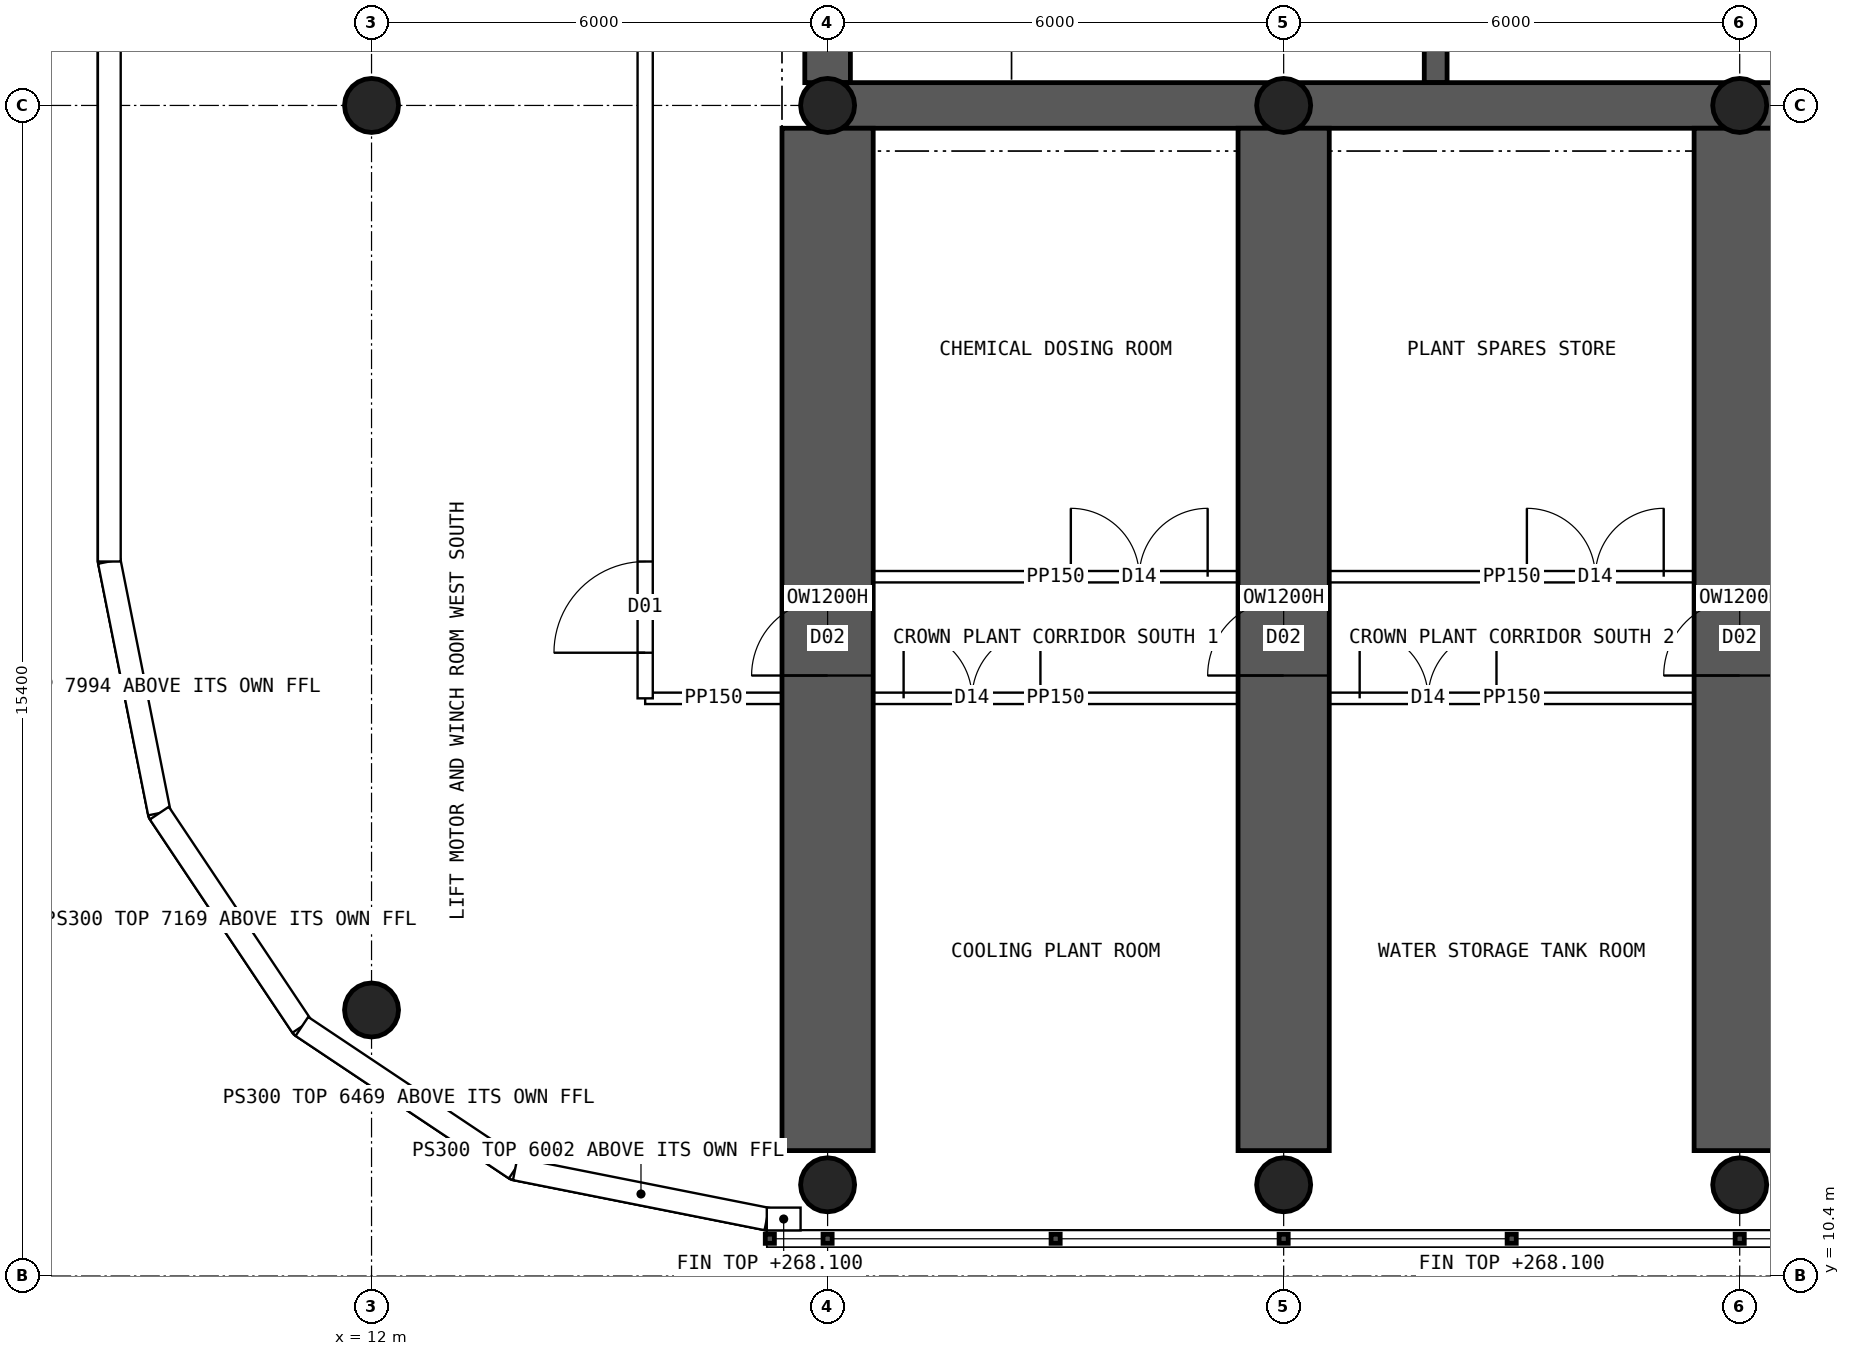
"""IFC4 building model, lengths in metres.
Left out: names, types, materials, properties, quantities, classifications, styles, units other than length and angle.
Written with IfcOpenShell. Run it as: python <this file> out.ifc"""

import sys

from ifc_helpers import new_model, si_unit, direction, frame, frame_2d, origin, origin_2d, place, context, subcontext, project, spatial, polyline, rectangle, hollow_circle, outline, extrude, clip, halfspace, element, fill, save


model = new_model("IFC4")
c1 = context("Model", 3, precision=1e-05, world=origin(), true_north=direction((0.0, 1.0)))
c2 = subcontext(c1, "Body", "Model", "MODEL_VIEW")
j1 = project(units=[si_unit("LENGTHUNIT", "METRE"), si_unit("PLANEANGLEUNIT", "RADIAN")], contexts=[c1])
p1 = place(None, origin())
s1 = spatial("IfcSite", under=j1, at=p1, CompositionType="ELEMENT")
p2 = place(p1, origin())
s2 = spatial("IfcBuilding", under=s1, at=p2, CompositionType="ELEMENT")
p3 = place(p2, frame((0.0, 0.0, 262.3)))
s3 = spatial("IfcBuildingStorey", under=s2, at=p3, CompositionType="ELEMENT", Elevation=262.3)
p4 = place(p3, frame((18.0, 25.8, 0.0), z_axis=(0.0, 0.0, 1.0), x_axis=(1.0, 0.0, 0.0)))
e1 = element("IfcWall", 1, at=p4, inside=s3, PredefinedType="SHEAR", context=c2, shape_type="SweptSolid", body=[
    extrude(rectangle(XDim=48.0, YDim=0.6, at=frame_2d((24.0, 0.0))), origin(), (0.0, 0.0, 1.0), 6.0),
])
p5 = place(p3, frame((18.0, 26.1, 0.0), z_axis=(0.0, 0.0, 1.0), x_axis=(0.0, 1.0, 0.0)))
e2 = element("IfcWall", 2, at=p5, inside=s3, PredefinedType="SHEAR", context=c2, shape_type="SweptSolid", body=[
    extrude(rectangle(XDim=11.8, YDim=0.6, at=frame_2d((5.9, 0.0))), origin(), (0.0, 0.0, 1.0), 6.0),
])
p6 = place(p5, frame((5.2, 0.0, 0.0)))
e3 = element("IfcOpeningElement", 3, at=p6, cuts=e2, PredefinedType="OPENING", context=c2, shape_type="SweptSolid", body=[
    extrude(rectangle(XDim=1.2, YDim=2.1, at=frame_2d((0.6, 1.05))), frame((0.0, 0.31, 0.0), z_axis=(0.0, -1.0, 0.0), x_axis=(1.0, 0.0, 0.0)), (0.0, 0.0, 1.0), 0.62),
])
p7 = place(p3, frame((26.0, 26.1, 0.0), z_axis=(0.0, 0.0, 1.0), x_axis=(0.0, 1.0, 0.0)))
e4 = element("IfcWall", 4, at=p7, inside=s3, PredefinedType="SHEAR", context=c2, shape_type="SweptSolid", body=[
    extrude(rectangle(XDim=4.15, YDim=0.3, at=frame_2d((2.075, 0.0))), origin(), (0.0, 0.0, 1.0), 6.0),
])
p8 = place(p3, frame((18.0, 12.05, 0.0), z_axis=(0.0, 0.0, 1.0), x_axis=(0.0, 1.0, 0.0)))
e5 = element("IfcWall", 5, at=p8, inside=s3, PredefinedType="SHEAR", context=c2, shape_type="SweptSolid", body=[
    extrude(rectangle(XDim=13.45, YDim=1.2, at=frame_2d((6.725, 0.0))), origin(), (0.0, 0.0, 1.0), 4.4),
])
p9 = place(p8, frame((6.25, 0.0, 0.0)))
e6 = element("IfcOpeningElement", 6, at=p9, cuts=e5, PredefinedType="OPENING", context=c2, shape_type="SweptSolid", body=[
    extrude(rectangle(XDim=1.0, YDim=2.1, at=frame_2d((0.5, 1.05))), frame((0.0, 0.61, 0.0), z_axis=(0.0, -1.0, 0.0), x_axis=(1.0, 0.0, 0.0)), (0.0, 0.0, 1.0), 1.22),
])
p10 = place(p3, frame((24.0, 12.05, 0.0), z_axis=(0.0, 0.0, 1.0), x_axis=(0.0, 1.0, 0.0)))
e7 = element("IfcWall", 7, at=p10, inside=s3, PredefinedType="SHEAR", context=c2, shape_type="SweptSolid", body=[
    extrude(rectangle(XDim=13.45, YDim=1.2, at=frame_2d((6.725, 0.0))), origin(), (0.0, 0.0, 1.0), 4.4),
])
p11 = place(p10, frame((6.25, 0.0, 0.0)))
e8 = element("IfcOpeningElement", 8, at=p11, cuts=e7, PredefinedType="OPENING", context=c2, shape_type="SweptSolid", body=[
    extrude(rectangle(XDim=1.0, YDim=2.1, at=frame_2d((0.5, 1.05))), frame((0.0, 0.61, 0.0), z_axis=(0.0, -1.0, 0.0), x_axis=(1.0, 0.0, 0.0)), (0.0, 0.0, 1.0), 1.22),
])
p12 = place(p3, frame((30.0, 12.05, 0.0), z_axis=(0.0, 0.0, 1.0), x_axis=(0.0, 1.0, 0.0)))
e9 = element("IfcWall", 9, at=p12, inside=s3, PredefinedType="SHEAR", context=c2, shape_type="SweptSolid", body=[
    extrude(rectangle(XDim=13.45, YDim=1.2, at=frame_2d((6.725, 0.0))), origin(), (0.0, 0.0, 1.0), 4.4),
])
p13 = place(p12, frame((6.25, 0.0, 0.0)))
e10 = element("IfcOpeningElement", 10, at=p13, cuts=e9, PredefinedType="OPENING", context=c2, shape_type="SweptSolid", body=[
    extrude(rectangle(XDim=1.0, YDim=2.1, at=frame_2d((0.5, 1.05))), frame((0.0, 0.61, 0.0), z_axis=(0.0, -1.0, 0.0), x_axis=(1.0, 0.0, 0.0)), (0.0, 0.0, 1.0), 1.22),
])
p14 = place(p3, frame((12.0, 13.9, 0.0), z_axis=(0.0, 0.0, 1.0), x_axis=(1.0, 0.0, 0.0)))
e11 = element("IfcColumn", 11, at=p14, inside=s3, PredefinedType="COLUMN", context=c2, shape_type="SweptSolid", body=[
    extrude(hollow_circle(Radius=0.355, WallThickness=0.025, at=origin_2d()), origin(), (0.0, 0.0, 1.0), 5.466),
])
p15 = place(p3, frame((12.0, 25.8, 0.0), z_axis=(0.0, 0.0, 1.0), x_axis=(1.0, 0.0, 0.0)))
e12 = element("IfcColumn", 12, at=p15, inside=s3, PredefinedType="COLUMN", context=c2, shape_type="SweptSolid", body=[
    extrude(hollow_circle(Radius=0.355, WallThickness=0.025, at=origin_2d()), origin(), (0.0, 0.0, 1.0), 8.433),
])
p16 = place(p3, frame((18.0, 11.6, 0.0), z_axis=(0.0, 0.0, 1.0), x_axis=(1.0, 0.0, 0.0)))
e13 = element("IfcColumn", 13, at=p16, inside=s3, PredefinedType="COLUMN", context=c2, shape_type="SweptSolid", body=[
    extrude(hollow_circle(Radius=0.355, WallThickness=0.025, at=origin_2d()), origin(), (0.0, 0.0, 1.0), 4.885),
])
p17 = place(p3, frame((18.0, 25.8, 0.0), z_axis=(0.0, 0.0, 1.0), x_axis=(1.0, 0.0, 0.0)))
e14 = element("IfcColumn", 14, at=p17, inside=s3, PredefinedType="COLUMN", context=c2, shape_type="SweptSolid", body=[
    extrude(hollow_circle(Radius=0.355, WallThickness=0.025, at=origin_2d()), origin(), (0.0, 0.0, 1.0), 8.426),
])
p18 = place(p3, frame((24.0, 11.6, 0.0), z_axis=(0.0, 0.0, 1.0), x_axis=(1.0, 0.0, 0.0)))
e15 = element("IfcColumn", 15, at=p18, inside=s3, PredefinedType="COLUMN", context=c2, shape_type="SweptSolid", body=[
    extrude(hollow_circle(Radius=0.355, WallThickness=0.025, at=origin_2d()), origin(), (0.0, 0.0, 1.0), 4.885),
])
p19 = place(p3, frame((24.0, 25.8, 0.0), z_axis=(0.0, 0.0, 1.0), x_axis=(1.0, 0.0, 0.0)))
e16 = element("IfcColumn", 16, at=p19, inside=s3, PredefinedType="COLUMN", context=c2, shape_type="SweptSolid", body=[
    extrude(hollow_circle(Radius=0.355, WallThickness=0.025, at=origin_2d()), origin(), (0.0, 0.0, 1.0), 8.426),
])
p20 = place(p3, frame((30.0, 11.6, 0.0), z_axis=(0.0, 0.0, 1.0), x_axis=(1.0, 0.0, 0.0)))
e17 = element("IfcColumn", 17, at=p20, inside=s3, PredefinedType="COLUMN", context=c2, shape_type="SweptSolid", body=[
    extrude(hollow_circle(Radius=0.355, WallThickness=0.025, at=origin_2d()), origin(), (0.0, 0.0, 1.0), 4.885),
])
p21 = place(p3, frame((30.0, 25.8, 0.0), z_axis=(0.0, 0.0, 1.0), x_axis=(1.0, 0.0, 0.0)))
e18 = element("IfcColumn", 18, at=p21, inside=s3, PredefinedType="COLUMN", context=c2, shape_type="SweptSolid", body=[
    extrude(hollow_circle(Radius=0.355, WallThickness=0.025, at=origin_2d()), origin(), (0.0, 0.0, 1.0), 8.426),
])
p22 = place(p3, frame((8.55, 44.2, 0.0), z_axis=(0.0, 0.0, 1.0), x_axis=(0.0, -1.0, 0.0)))
e19 = element("IfcWall", 19, at=p22, inside=s3, PredefinedType="SOLIDWALL", context=c2, shape_type="Clipping", body=[
    clip(clip(extrude(outline(polyline([(-0.025, 0.0), (24.425, 0.0), (24.425, 7.988), (-0.025, 14.084), (-0.025, 0.0)])), frame((0.0, 0.15, 0.0), z_axis=(0.0, -1.0, 0.0), x_axis=(1.0, 0.0, 0.0)), (0.0, 0.0, 1.0), 0.3), halfspace(frame((0.0, 0.0, 0.0), z_axis=(-0.995184726707, 0.098017139978, 0.0)), False)), halfspace(frame((24.4, 0.0, 0.0), z_axis=(0.995184726707, 0.098017139978, 0.0)), False)),
])
p23 = place(p3, frame((8.55, 19.8, 0.0), z_axis=(0.0, 0.0, 1.0), x_axis=(0.19508664885, -0.980786011034, 0.0)))
e20 = element("IfcWall", 20, at=p23, inside=s3, PredefinedType="SOLIDWALL", context=c2, shape_type="Clipping", body=[
    clip(clip(extrude(outline(polyline([(-0.04, 0.0), (3.415, 0.0), (3.415, 7.159), (3.375, 7.169), (-0.04, 8.004), (-0.04, 0.0)])), frame((0.0, 0.15, 0.0), z_axis=(0.0, -1.0, 0.0), x_axis=(1.0, 0.0, 0.0)), (0.0, 0.0, 1.0), 0.3), halfspace(frame((0.0, 0.0, 0.0), z_axis=(-0.995184765828, 0.098016742771, 0.0)), False)), halfspace(frame((3.375, 0.0, 0.0), z_axis=(0.980785349348, 0.195089975409, 0.0)), False)),
])
p24 = place(p3, frame((9.208, 16.49, 0.0), z_axis=(0.0, 0.0, 1.0), x_axis=(0.555567969291, -0.831471124873, 0.0)))
e21 = element("IfcWall", 21, at=p24, inside=s3, PredefinedType="SOLIDWALL", context=c2, shape_type="Clipping", body=[
    clip(clip(extrude(outline(polyline([(-0.04, 0.0), (3.415, 0.0), (3.415, 6.461), (-0.04, 7.177), (-0.04, 0.0)])), frame((0.0, 0.15, 0.0), z_axis=(0.0, -1.0, 0.0), x_axis=(1.0, 0.0, 0.0)), (0.0, 0.0, 1.0), 0.3), halfspace(frame((0.0, 0.0, 0.0), z_axis=(-0.980785349348, 0.195089975409, 0.0)), False)), halfspace(frame((3.375, 0.0, 0.0), z_axis=(0.980785349348, 0.195089975409, 0.0)), False)),
])
p25 = place(p3, frame((11.083, 13.684, 0.0), z_axis=(0.0, 0.0, 1.0), x_axis=(0.831460037396, -0.555584562613, 0.0)))
e22 = element("IfcWall", 22, at=p25, inside=s3, PredefinedType="SOLIDWALL", context=c2, shape_type="Clipping", body=[
    clip(clip(extrude(outline(polyline([(-0.04, 0.0), (3.415, 0.0), (3.415, 5.996), (3.375, 6.001), (-0.04, 6.475), (-0.04, 0.0)])), frame((0.0, 0.15, 0.0), z_axis=(0.0, -1.0, 0.0), x_axis=(1.0, 0.0, 0.0)), (0.0, 0.0, 1.0), 0.3), halfspace(frame((0.0, 0.0, 0.0), z_axis=(-0.980785349348, 0.195089975409, 0.0)), False)), halfspace(frame((3.375, 0.0, 0.0), z_axis=(0.980785349348, 0.195089975409, 0.0)), False)),
])
p26 = place(p3, frame((13.89, 11.808, 0.0), z_axis=(0.0, 0.0, 1.0), x_axis=(0.98078325777, -0.195100490205, 0.0)))
e23 = element("IfcWall", 23, at=p26, inside=s3, PredefinedType="SOLIDWALL", context=c2, shape_type="Clipping", body=[
    clip(clip(extrude(outline(polyline([(-0.04, 0.0), (3.415, 0.0), (3.415, 5.835), (-0.04, 6.003), (-0.04, 0.0)])), frame((0.0, 0.15, 0.0), z_axis=(0.0, -1.0, 0.0), x_axis=(1.0, 0.0, 0.0)), (0.0, 0.0, 1.0), 0.3), halfspace(frame((0.0, 0.0, 0.0), z_axis=(-0.980785349348, 0.195089975409, 0.0)), False)), halfspace(frame((3.375, 0.0, 0.0), z_axis=(0.980785349348, 0.195089975409, 0.0)), False)),
])
p27 = place(p3, frame((17.2, 11.15, 0.0), z_axis=(0.0, 0.0, 1.0), x_axis=(1.0, 0.0, 0.0)))
e24 = element("IfcWall", 24, at=p27, inside=s3, PredefinedType="SOLIDWALL", context=c2, shape_type="SweptSolid", body=[
    extrude(outline(polyline([(0.0, 0.0), (0.445, 0.0), (0.445, 5.837), (0.0, 5.837), (0.0, 0.0)])), frame((0.0, 0.15, 0.0), z_axis=(0.0, -1.0, 0.0), x_axis=(1.0, 0.0, 0.0)), (0.0, 0.0, 1.0), 0.3),
])
p28 = place(p3, frame((15.6, 18.0, 0.0), z_axis=(0.0, 0.0, 1.0), x_axis=(0.0, 1.0, 0.0)))
e25 = element("IfcWall", 25, at=p28, inside=s3, PredefinedType="SOLIDWALL", context=c2, shape_type="SweptSolid", body=[
    extrude(rectangle(XDim=28.0, YDim=0.2, at=frame_2d((14.0, 0.0))), origin(), (0.0, 0.0, 1.0), 6.0),
])
p29 = place(p28, frame((13.1, 0.0, 0.0)))
e26 = element("IfcOpeningElement", 26, at=p29, cuts=e25, PredefinedType="OPENING", context=c2, shape_type="SweptSolid", body=[
    extrude(rectangle(XDim=1.8, YDim=2.1, at=frame_2d((0.9, 1.05))), frame((0.0, 0.11, 0.0), z_axis=(0.0, -1.0, 0.0), x_axis=(1.0, 0.0, 0.0)), (0.0, 0.0, 1.0), 0.22),
])
p30 = place(p28, frame((0.6, 0.0, 0.0)))
e27 = element("IfcOpeningElement", 27, at=p30, cuts=e25, PredefinedType="OPENING", context=c2, shape_type="SweptSolid", body=[
    extrude(rectangle(XDim=1.2, YDim=2.1, at=frame_2d((0.6, 1.05))), frame((0.0, 0.11, 0.0), z_axis=(0.0, -1.0, 0.0), x_axis=(1.0, 0.0, 0.0)), (0.0, 0.0, 1.0), 0.22),
])
p31 = place(p28, frame((26.2, 0.0, 0.0)))
e28 = element("IfcOpeningElement", 28, at=p31, cuts=e25, PredefinedType="OPENING", context=c2, shape_type="SweptSolid", body=[
    extrude(rectangle(XDim=1.2, YDim=2.1, at=frame_2d((0.6, 1.05))), frame((0.0, 0.11, 0.0), z_axis=(0.0, -1.0, 0.0), x_axis=(1.0, 0.0, 0.0)), (0.0, 0.0, 1.0), 0.22),
])
p32 = place(p3, frame((15.6, 18.0, 0.0), z_axis=(0.0, 0.0, 1.0), x_axis=(1.0, 0.0, 0.0)))
e29 = element("IfcWall", 29, at=p32, inside=s3, PredefinedType="PARTITIONING", context=c2, shape_type="SweptSolid", body=[
    extrude(rectangle(XDim=1.8, YDim=0.15, at=frame_2d((0.9, 0.0))), origin(), (0.0, 0.0, 1.0), 6.0),
])
p33 = place(p3, frame((18.6, 18.0, 0.0), z_axis=(0.0, 0.0, 1.0), x_axis=(1.0, 0.0, 0.0)))
e30 = element("IfcWall", 30, at=p33, inside=s3, PredefinedType="PARTITIONING", context=c2, shape_type="SweptSolid", body=[
    extrude(rectangle(XDim=4.8, YDim=0.15, at=frame_2d((2.4, 0.0))), origin(), (0.0, 0.0, 1.0), 6.0),
])
p34 = place(p33, frame((0.4, 0.0, 0.0)))
e31 = element("IfcOpeningElement", 31, at=p34, cuts=e30, PredefinedType="OPENING", context=c2, shape_type="SweptSolid", body=[
    extrude(rectangle(XDim=1.8, YDim=2.4, at=frame_2d((0.9, 1.2))), frame((0.0, 0.085, 0.0), z_axis=(0.0, -1.0, 0.0), x_axis=(1.0, 0.0, 0.0)), (0.0, 0.0, 1.0), 0.17),
])
p35 = place(p3, frame((18.6, 19.6, 0.0), z_axis=(0.0, 0.0, 1.0), x_axis=(1.0, 0.0, 0.0)))
e32 = element("IfcWall", 32, at=p35, inside=s3, PredefinedType="PARTITIONING", context=c2, shape_type="SweptSolid", body=[
    extrude(rectangle(XDim=4.8, YDim=0.15, at=frame_2d((2.4, 0.0))), origin(), (0.0, 0.0, 1.0), 6.0),
])
p36 = place(p35, frame((2.6, 0.0, 0.0)))
e33 = element("IfcOpeningElement", 33, at=p36, cuts=e32, PredefinedType="OPENING", context=c2, shape_type="SweptSolid", body=[
    extrude(rectangle(XDim=1.8, YDim=2.4, at=frame_2d((0.9, 1.2))), frame((0.0, 0.085, 0.0), z_axis=(0.0, -1.0, 0.0), x_axis=(1.0, 0.0, 0.0)), (0.0, 0.0, 1.0), 0.17),
])
p37 = place(p3, frame((24.6, 18.0, 0.0), z_axis=(0.0, 0.0, 1.0), x_axis=(1.0, 0.0, 0.0)))
e34 = element("IfcWall", 34, at=p37, inside=s3, PredefinedType="PARTITIONING", context=c2, shape_type="SweptSolid", body=[
    extrude(rectangle(XDim=4.8, YDim=0.15, at=frame_2d((2.4, 0.0))), origin(), (0.0, 0.0, 1.0), 6.0),
])
p38 = place(p37, frame((0.4, 0.0, 0.0)))
e35 = element("IfcOpeningElement", 35, at=p38, cuts=e34, PredefinedType="OPENING", context=c2, shape_type="SweptSolid", body=[
    extrude(rectangle(XDim=1.8, YDim=2.4, at=frame_2d((0.9, 1.2))), frame((0.0, 0.085, 0.0), z_axis=(0.0, -1.0, 0.0), x_axis=(1.0, 0.0, 0.0)), (0.0, 0.0, 1.0), 0.17),
])
p39 = place(p3, frame((24.6, 19.6, 0.0), z_axis=(0.0, 0.0, 1.0), x_axis=(1.0, 0.0, 0.0)))
e36 = element("IfcWall", 36, at=p39, inside=s3, PredefinedType="PARTITIONING", context=c2, shape_type="SweptSolid", body=[
    extrude(rectangle(XDim=4.8, YDim=0.15, at=frame_2d((2.4, 0.0))), origin(), (0.0, 0.0, 1.0), 6.0),
])
p40 = place(p39, frame((2.6, 0.0, 0.0)))
e37 = element("IfcOpeningElement", 37, at=p40, cuts=e36, PredefinedType="OPENING", context=c2, shape_type="SweptSolid", body=[
    extrude(rectangle(XDim=1.8, YDim=2.4, at=frame_2d((0.9, 1.2))), frame((0.0, 0.085, 0.0), z_axis=(0.0, -1.0, 0.0), x_axis=(1.0, 0.0, 0.0)), (0.0, 0.0, 1.0), 0.17),
])
p41 = place(p30, origin())
e38 = element("IfcDoor", 38, at=p41, inside=s3, OperationType="SINGLE_SWING_LEFT", PredefinedType="DOOR", context=c2, shape_type="SweptSolid", body=[
    extrude(rectangle(XDim=1.2, YDim=2.1, at=frame_2d((0.6, 1.05))), frame((0.0, 0.025, 0.0), z_axis=(0.0, -1.0, 0.0), x_axis=(1.0, 0.0, 0.0)), (0.0, 0.0, 1.0), 0.05),
])
fill(e27, e38)
p42 = place(p9, origin())
e39 = element("IfcDoor", 39, at=p42, inside=s3, OperationType="SINGLE_SWING_LEFT", PredefinedType="DOOR", context=c2, shape_type="SweptSolid", body=[
    extrude(rectangle(XDim=1.0, YDim=2.1, at=frame_2d((0.5, 1.05))), frame((0.0, 0.025, 0.0), z_axis=(0.0, -1.0, 0.0), x_axis=(1.0, 0.0, 0.0)), (0.0, 0.0, 1.0), 0.05),
])
fill(e6, e39)
p43 = place(p11, origin())
e40 = element("IfcDoor", 40, at=p43, inside=s3, OperationType="SINGLE_SWING_LEFT", PredefinedType="DOOR", context=c2, shape_type="SweptSolid", body=[
    extrude(rectangle(XDim=1.0, YDim=2.1, at=frame_2d((0.5, 1.05))), frame((0.0, 0.025, 0.0), z_axis=(0.0, -1.0, 0.0), x_axis=(1.0, 0.0, 0.0)), (0.0, 0.0, 1.0), 0.05),
])
fill(e8, e40)
p44 = place(p13, origin())
e41 = element("IfcDoor", 41, at=p44, inside=s3, OperationType="SINGLE_SWING_LEFT", PredefinedType="DOOR", context=c2, shape_type="SweptSolid", body=[
    extrude(rectangle(XDim=1.0, YDim=2.1, at=frame_2d((0.5, 1.05))), frame((0.0, 0.025, 0.0), z_axis=(0.0, -1.0, 0.0), x_axis=(1.0, 0.0, 0.0)), (0.0, 0.0, 1.0), 0.05),
])
fill(e10, e41)
p45 = place(p34, origin())
e42 = element("IfcDoor", 42, at=p45, inside=s3, OperationType="DOUBLE_DOOR_SINGLE_SWING", PredefinedType="DOOR", context=c2, shape_type="SweptSolid", body=[
    extrude(rectangle(XDim=1.8, YDim=2.4, at=frame_2d((0.9, 1.2))), frame((0.0, 0.025, 0.0), z_axis=(0.0, -1.0, 0.0), x_axis=(1.0, 0.0, 0.0)), (0.0, 0.0, 1.0), 0.05),
])
fill(e31, e42)
p46 = place(p36, origin())
e43 = element("IfcDoor", 43, at=p46, inside=s3, OperationType="DOUBLE_DOOR_SINGLE_SWING", PredefinedType="DOOR", context=c2, shape_type="SweptSolid", body=[
    extrude(rectangle(XDim=1.8, YDim=2.4, at=frame_2d((0.9, 1.2))), frame((0.0, 0.025, 0.0), z_axis=(0.0, -1.0, 0.0), x_axis=(1.0, 0.0, 0.0)), (0.0, 0.0, 1.0), 0.05),
])
fill(e33, e43)
p47 = place(p38, origin())
e44 = element("IfcDoor", 44, at=p47, inside=s3, OperationType="DOUBLE_DOOR_SINGLE_SWING", PredefinedType="DOOR", context=c2, shape_type="SweptSolid", body=[
    extrude(rectangle(XDim=1.8, YDim=2.4, at=frame_2d((0.9, 1.2))), frame((0.0, 0.025, 0.0), z_axis=(0.0, -1.0, 0.0), x_axis=(1.0, 0.0, 0.0)), (0.0, 0.0, 1.0), 0.05),
])
fill(e35, e44)
p48 = place(p40, origin())
e45 = element("IfcDoor", 45, at=p48, inside=s3, OperationType="DOUBLE_DOOR_SINGLE_SWING", PredefinedType="DOOR", context=c2, shape_type="SweptSolid", body=[
    extrude(rectangle(XDim=1.8, YDim=2.4, at=frame_2d((0.9, 1.2))), frame((0.0, 0.025, 0.0), z_axis=(0.0, -1.0, 0.0), x_axis=(1.0, 0.0, 0.0)), (0.0, 0.0, 1.0), 0.05),
])
fill(e37, e45)
save(model, sys.argv[1])
